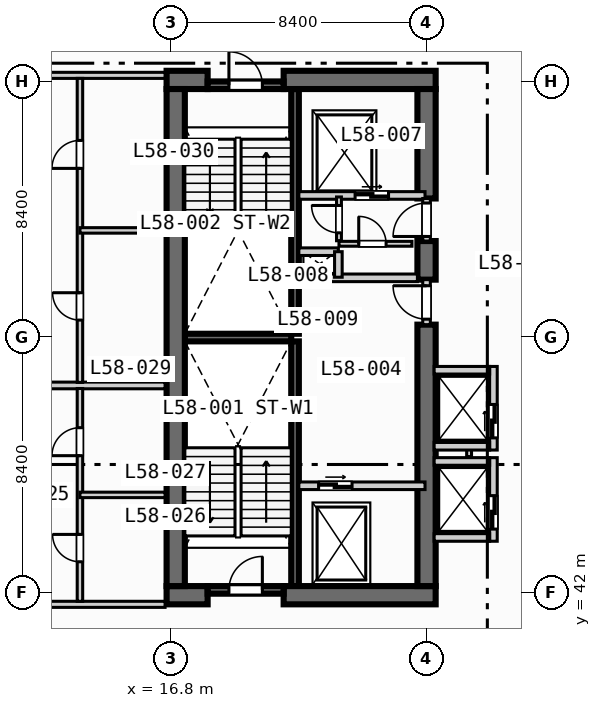
"""IFC4 building model, lengths in metres.
Left out: names, types, materials, properties, quantities, classifications, styles, units other than length and angle.
Written with IfcOpenShell. Run it as: python <this file> out.ifc"""

import sys

from ifc_helpers import new_model, si_unit, direction, frame, frame_2d, origin, place, context, subcontext, project, spatial, rectangle, extrude, element, fill, save


model = new_model("IFC4")
c1 = context("Model", 3, precision=1e-05, world=origin(), true_north=direction((0.0, 1.0)))
c2 = subcontext(c1, "Body", "Model", "MODEL_VIEW")
j1 = project(units=[si_unit("LENGTHUNIT", "METRE"), si_unit("PLANEANGLEUNIT", "RADIAN")], contexts=[c1])
p1 = place(None, origin())
s1 = spatial("IfcSite", under=j1, at=p1, CompositionType="ELEMENT")
p2 = place(p1, origin())
s2 = spatial("IfcBuilding", under=s1, at=p2, CompositionType="ELEMENT")
p3 = place(p2, frame((0.0, 0.0, 237.9)))
s3 = spatial("IfcBuildingStorey", under=s2, at=p3, CompositionType="ELEMENT", Elevation=237.9)
for number, where, z_axis, x_axis in (
    (1, (20.875, 42.2, 0.0), (0.0, 0.0, 1.0), (0.0, 1.0, 0.0)),
    (2, (20.875, 50.5, 0.0), (0.0, 0.0, 1.0), (0.0, 1.0, 0.0)),
):
    element("IfcWall", number, at=place(p3, frame(where, z_axis=z_axis, x_axis=x_axis)), inside=s3, PredefinedType="SOLIDWALL", context=c2, shape_type="SweptSolid", body=[
        extrude(rectangle(XDim=8.05, YDim=0.25, at=frame_2d((4.025, 0.0))), origin(), (0.0, 0.0, 1.0), 3.47),
    ])
p4 = place(p3, frame((17.25, 50.375, 0.0), z_axis=(0.0, 0.0, 1.0), x_axis=(1.0, 0.0, 0.0)))
e3 = element("IfcWall", 3, at=p4, inside=s3, PredefinedType="SOLIDWALL", context=c2, shape_type="SweptSolid", body=[
    extrude(rectangle(XDim=3.5, YDim=0.25, at=frame_2d((1.75, 0.0))), origin(), (0.0, 0.0, 1.0), 3.47),
])
p5 = place(p3, frame((16.65, 41.9, 0.0), z_axis=(0.0, 0.0, 1.0), x_axis=(1.0, 0.0, 0.0)))
e4 = element("IfcWall", 4, at=p5, inside=s3, PredefinedType="SHEAR", context=c2, shape_type="SweptSolid", body=[
    extrude(rectangle(XDim=1.35, YDim=0.6, at=frame_2d((0.675, 0.0))), origin(), (0.0, 0.0, 1.0), 3.47),
])
p6 = place(p3, frame((20.5, 41.9, 0.0), z_axis=(0.0, 0.0, 1.0), x_axis=(1.0, 0.0, 0.0)))
e5 = element("IfcWall", 5, at=p6, inside=s3, PredefinedType="SHEAR", context=c2, shape_type="SweptSolid", body=[
    extrude(rectangle(XDim=5.0, YDim=0.6, at=frame_2d((2.5, 0.0))), origin(), (0.0, 0.0, 1.0), 3.47),
])
p7 = place(p3, frame((16.65, 58.85, 0.0), z_axis=(0.0, 0.0, 1.0), x_axis=(1.0, 0.0, 0.0)))
e6 = element("IfcWall", 6, at=p7, inside=s3, PredefinedType="SHEAR", context=c2, shape_type="SweptSolid", body=[
    extrude(rectangle(XDim=1.35, YDim=0.6, at=frame_2d((0.675, 0.0))), origin(), (0.0, 0.0, 1.0), 3.47),
])
p8 = place(p3, frame((20.5, 58.85, 0.0), z_axis=(0.0, 0.0, 1.0), x_axis=(1.0, 0.0, 0.0)))
e7 = element("IfcWall", 7, at=p8, inside=s3, PredefinedType="SHEAR", context=c2, shape_type="SweptSolid", body=[
    extrude(rectangle(XDim=5.0, YDim=0.6, at=frame_2d((2.5, 0.0))), origin(), (0.0, 0.0, 1.0), 3.47),
])
p9 = place(p3, frame((16.95, 42.2, 0.0), z_axis=(0.0, 0.0, 1.0), x_axis=(0.0, 1.0, 0.0)))
e8 = element("IfcWall", 8, at=p9, inside=s3, PredefinedType="SHEAR", context=c2, shape_type="SweptSolid", body=[
    extrude(rectangle(XDim=16.35, YDim=0.6, at=frame_2d((8.175, 0.0))), origin(), (0.0, 0.0, 1.0), 3.47),
])
p10 = place(p3, frame((25.2, 42.2, 0.0), z_axis=(0.0, 0.0, 1.0), x_axis=(0.0, 1.0, 0.0)))
e9 = element("IfcWall", 9, at=p10, inside=s3, PredefinedType="SHEAR", context=c2, shape_type="SweptSolid", body=[
    extrude(rectangle(XDim=8.6, YDim=0.6, at=frame_2d((4.3, 0.0))), origin(), (0.0, 0.0, 1.0), 3.47),
])
p11 = place(p3, frame((25.2, 52.28, 0.0), z_axis=(0.0, 0.0, 1.0), x_axis=(0.0, 1.0, 0.0)))
e10 = element("IfcWall", 10, at=p11, inside=s3, PredefinedType="SHEAR", context=c2, shape_type="SweptSolid", body=[
    extrude(rectangle(XDim=1.27, YDim=0.6, at=frame_2d((0.635, 0.0))), origin(), (0.0, 0.0, 1.0), 3.47),
])
p12 = place(p3, frame((25.2, 54.95, 0.0), z_axis=(0.0, 0.0, 1.0), x_axis=(0.0, 1.0, 0.0)))
e11 = element("IfcWall", 11, at=p12, inside=s3, PredefinedType="SHEAR", context=c2, shape_type="SweptSolid", body=[
    extrude(rectangle(XDim=3.6, YDim=0.6, at=frame_2d((1.8, 0.0))), origin(), (0.0, 0.0, 1.0), 3.47),
])
p13 = place(p3, frame((18.0, 42.075, 0.0), z_axis=(0.0, 0.0, 1.0), x_axis=(1.0, 0.0, 0.0)))
e12 = element("IfcWall", 12, at=p13, inside=s3, PredefinedType="SOLIDWALL", context=c2, shape_type="SweptSolid", body=[
    extrude(rectangle(XDim=2.5, YDim=0.25, at=frame_2d((1.25, 0.0))), origin(), (0.0, 0.0, 1.0), 3.47),
])
p14 = place(p13, frame((0.7, 0.0, 0.0)))
e13 = element("IfcOpeningElement", 13, at=p14, cuts=e12, PredefinedType="OPENING", context=c2, shape_type="SweptSolid", body=[
    extrude(rectangle(XDim=1.1, YDim=2.15, at=frame_2d((0.55, 1.075))), frame((0.0, 0.135, 0.0), z_axis=(0.0, -1.0, 0.0), x_axis=(1.0, 0.0, 0.0)), (0.0, 0.0, 1.0), 0.27),
])
p15 = place(p3, frame((18.0, 58.675, 0.0), z_axis=(0.0, 0.0, 1.0), x_axis=(1.0, 0.0, 0.0)))
e14 = element("IfcWall", 14, at=p15, inside=s3, PredefinedType="SOLIDWALL", context=c2, shape_type="SweptSolid", body=[
    extrude(rectangle(XDim=2.5, YDim=0.25, at=frame_2d((1.25, 0.0))), origin(), (0.0, 0.0, 1.0), 3.47),
])
p16 = place(p15, frame((0.7, 0.0, 0.0)))
e15 = element("IfcOpeningElement", 15, at=p16, cuts=e14, PredefinedType="OPENING", context=c2, shape_type="SweptSolid", body=[
    extrude(rectangle(XDim=1.1, YDim=2.15, at=frame_2d((0.55, 1.075))), frame((0.0, 0.135, 0.0), z_axis=(0.0, -1.0, 0.0), x_axis=(1.0, 0.0, 0.0)), (0.0, 0.0, 1.0), 0.27),
])
p17 = place(p3, frame((21.0, 45.5, 0.0), z_axis=(0.0, 0.0, 1.0), x_axis=(1.0, 0.0, 0.0)))
e16 = element("IfcWall", 16, at=p17, inside=s3, PredefinedType="SOLIDWALL", context=c2, shape_type="SweptSolid", body=[
    extrude(rectangle(XDim=4.15, YDim=0.25, at=frame_2d((2.075, 0.0))), origin(), (0.0, 0.0, 1.0), 3.47),
])
p18 = place(p17, frame((0.65, 0.0, 0.0)))
e17 = element("IfcOpeningElement", 17, at=p18, cuts=e16, PredefinedType="OPENING", context=c2, shape_type="SweptSolid", body=[
    extrude(rectangle(XDim=1.1, YDim=2.15, at=frame_2d((0.55, 1.075))), frame((0.0, 0.135, 0.0), z_axis=(0.0, -1.0, 0.0), x_axis=(1.0, 0.0, 0.0)), (0.0, 0.0, 1.0), 0.27),
])
p19 = place(p3, frame((25.2, 50.8, 0.0), z_axis=(0.0, 0.0, 1.0), x_axis=(0.0, 1.0, 0.0)))
e18 = element("IfcWall", 18, at=p19, inside=s3, PredefinedType="SOLIDWALL", context=c2, shape_type="SweptSolid", body=[
    extrude(rectangle(XDim=1.48, YDim=0.25, at=frame_2d((0.74, 0.0))), origin(), (0.0, 0.0, 1.0), 3.47),
])
p20 = place(p19, frame((0.18, 0.0, 0.0)))
e19 = element("IfcOpeningElement", 19, at=p20, cuts=e18, PredefinedType="OPENING", context=c2, shape_type="SweptSolid", body=[
    extrude(rectangle(XDim=1.1, YDim=2.15, at=frame_2d((0.55, 1.075))), frame((0.0, 0.135, 0.0), z_axis=(0.0, -1.0, 0.0), x_axis=(1.0, 0.0, 0.0)), (0.0, 0.0, 1.0), 0.27),
])
p21 = place(p3, frame((21.0, 52.34, 0.0), z_axis=(0.0, 0.0, 1.0), x_axis=(1.0, 0.0, 0.0)))
e20 = element("IfcWall", 20, at=p21, inside=s3, PredefinedType="SOLIDWALL", context=c2, shape_type="SweptSolid", body=[
    extrude(rectangle(XDim=3.9, YDim=0.25, at=frame_2d((1.95, 0.0))), origin(), (0.0, 0.0, 1.0), 3.47),
])
p22 = place(p3, frame((21.0, 55.05, 0.0), z_axis=(0.0, 0.0, 1.0), x_axis=(1.0, 0.0, 0.0)))
e21 = element("IfcWall", 21, at=p22, inside=s3, PredefinedType="SOLIDWALL", context=c2, shape_type="SweptSolid", body=[
    extrude(rectangle(XDim=4.15, YDim=0.25, at=frame_2d((2.075, 0.0))), origin(), (0.0, 0.0, 1.0), 3.47),
])
p23 = place(p22, frame((1.85, 0.0, 0.0)))
e22 = element("IfcOpeningElement", 22, at=p23, cuts=e21, PredefinedType="OPENING", context=c2, shape_type="SweptSolid", body=[
    extrude(rectangle(XDim=1.1, YDim=2.15, at=frame_2d((0.55, 1.075))), frame((0.0, 0.135, 0.0), z_axis=(0.0, -1.0, 0.0), x_axis=(1.0, 0.0, 0.0)), (0.0, 0.0, 1.0), 0.27),
])
p24 = place(p3, frame((25.2, 53.55, 0.0), z_axis=(0.0, 0.0, 1.0), x_axis=(0.0, 1.0, 0.0)))
e23 = element("IfcWall", 23, at=p24, inside=s3, PredefinedType="SOLIDWALL", context=c2, shape_type="SweptSolid", body=[
    extrude(rectangle(XDim=1.4, YDim=0.25, at=frame_2d((0.7, 0.0))), origin(), (0.0, 0.0, 1.0), 3.47),
])
p25 = place(p24, frame((0.15, 0.0, 0.0)))
e24 = element("IfcOpeningElement", 24, at=p25, cuts=e23, PredefinedType="OPENING", context=c2, shape_type="SweptSolid", body=[
    extrude(rectangle(XDim=1.1, YDim=2.15, at=frame_2d((0.55, 1.075))), frame((0.0, 0.135, 0.0), z_axis=(0.0, -1.0, 0.0), x_axis=(1.0, 0.0, 0.0)), (0.0, 0.0, 1.0), 0.27),
])
p26 = place(p3, frame((21.0, 53.2, 0.0), z_axis=(0.0, 0.0, 1.0), x_axis=(1.0, 0.0, 0.0)))
e25 = element("IfcWall", 25, at=p26, inside=s3, PredefinedType="SOLIDWALL", context=c2, shape_type="SweptSolid", body=[
    extrude(rectangle(XDim=1.3, YDim=0.25, at=frame_2d((0.65, 0.0))), origin(), (0.0, 0.0, 1.0), 3.47),
])
p27 = place(p3, frame((22.3, 52.36, 0.0), z_axis=(0.0, 0.0, 1.0), x_axis=(0.0, 1.0, 0.0)))
e26 = element("IfcWall", 26, at=p27, inside=s3, PredefinedType="SOLIDWALL", context=c2, shape_type="SweptSolid", body=[
    extrude(rectangle(XDim=0.84, YDim=0.25, at=frame_2d((0.42, 0.0))), origin(), (0.0, 0.0, 1.0), 3.47),
])
p28 = place(p3, frame((22.32, 53.56, 0.0), z_axis=(0.0, 0.0, 1.0), x_axis=(0.0, 1.0, 0.0)))
e27 = element("IfcWall", 27, at=p28, inside=s3, PredefinedType="PARTITIONING", context=c2, shape_type="SweptSolid", body=[
    extrude(rectangle(XDim=1.44, YDim=0.16, at=frame_2d((0.72, 0.0))), origin(), (0.0, 0.0, 1.0), 3.47),
])
p29 = place(p28, frame((0.26, 0.0, 0.0)))
e28 = element("IfcOpeningElement", 28, at=p29, cuts=e27, PredefinedType="OPENING", context=c2, shape_type="SweptSolid", body=[
    extrude(rectangle(XDim=0.9, YDim=2.1, at=frame_2d((0.45, 1.05))), frame((0.0, 0.09, 0.0), z_axis=(0.0, -1.0, 0.0), x_axis=(1.0, 0.0, 0.0)), (0.0, 0.0, 1.0), 0.18),
])
p30 = place(p3, frame((22.32, 53.46, 0.0), z_axis=(0.0, 0.0, 1.0), x_axis=(1.0, 0.0, 0.0)))
e29 = element("IfcWall", 29, at=p30, inside=s3, PredefinedType="PARTITIONING", context=c2, shape_type="SweptSolid", body=[
    extrude(rectangle(XDim=2.4, YDim=0.16, at=frame_2d((1.2, 0.0))), origin(), (0.0, 0.0, 1.0), 3.47),
])
p31 = place(p30, frame((0.65, 0.0, 0.0)))
e30 = element("IfcOpeningElement", 30, at=p31, cuts=e29, PredefinedType="OPENING", context=c2, shape_type="SweptSolid", body=[
    extrude(rectangle(XDim=0.9, YDim=2.1, at=frame_2d((0.45, 1.05))), frame((0.0, 0.09, 0.0), z_axis=(0.0, -1.0, 0.0), x_axis=(1.0, 0.0, 0.0)), (0.0, 0.0, 1.0), 0.18),
])
p32 = place(p3, frame((27.4, 43.675, 0.0), z_axis=(0.0, 0.0, 1.0), x_axis=(0.0, 1.0, 0.0)))
e31 = element("IfcWall", 31, at=p32, inside=s3, PredefinedType="SOLIDWALL", context=c2, shape_type="SweptSolid", body=[
    extrude(rectangle(XDim=2.75, YDim=0.25, at=frame_2d((1.375, 0.0))), origin(), (0.0, 0.0, 1.0), 3.47),
])
p33 = place(p32, frame((0.4, 0.0, 0.0)))
e32 = element("IfcOpeningElement", 32, at=p33, cuts=e31, PredefinedType="OPENING", context=c2, shape_type="SweptSolid", body=[
    extrude(rectangle(XDim=1.1, YDim=2.15, at=frame_2d((0.55, 1.075))), frame((0.0, 0.135, 0.0), z_axis=(0.0, -1.0, 0.0), x_axis=(1.0, 0.0, 0.0)), (0.0, 0.0, 1.0), 0.27),
])
for number, where, z_axis, x_axis in (
    (33, (25.45, 43.8, 0.0), (0.0, 0.0, 1.0), (1.0, 0.0, 0.0)),
    (34, (25.45, 46.3, 0.0), (0.0, 0.0, 1.0), (1.0, 0.0, 0.0)),
):
    element("IfcWall", number, at=place(p3, frame(where, z_axis=z_axis, x_axis=x_axis)), inside=s3, PredefinedType="SOLIDWALL", context=c2, shape_type="SweptSolid", body=[
        extrude(rectangle(XDim=1.825, YDim=0.25, at=frame_2d((0.913, 0.0))), origin(), (0.0, 0.0, 1.0), 3.47),
    ])
p34 = place(p3, frame((26.6, 46.46, 0.0), z_axis=(0.0, 0.0, 1.0), x_axis=(0.0, 1.0, 0.0)))
e35 = element("IfcWall", 35, at=p34, inside=s3, PredefinedType="PARTITIONING", context=c2, shape_type="SweptSolid", body=[
    extrude(rectangle(XDim=0.88, YDim=0.16, at=frame_2d((0.44, 0.0))), origin(), (0.0, 0.0, 1.0), 3.47),
])
p35 = place(p3, frame((27.4, 46.675, 0.0), z_axis=(0.0, 0.0, 1.0), x_axis=(0.0, 1.0, 0.0)))
e36 = element("IfcWall", 36, at=p35, inside=s3, PredefinedType="SOLIDWALL", context=c2, shape_type="SweptSolid", body=[
    extrude(rectangle(XDim=2.75, YDim=0.25, at=frame_2d((1.375, 0.0))), origin(), (0.0, 0.0, 1.0), 3.47),
])
p36 = place(p35, frame((0.4, 0.0, 0.0)))
e37 = element("IfcOpeningElement", 37, at=p36, cuts=e36, PredefinedType="OPENING", context=c2, shape_type="SweptSolid", body=[
    extrude(rectangle(XDim=1.1, YDim=2.15, at=frame_2d((0.55, 1.075))), frame((0.0, 0.135, 0.0), z_axis=(0.0, -1.0, 0.0), x_axis=(1.0, 0.0, 0.0)), (0.0, 0.0, 1.0), 0.27),
])
for number, where, z_axis, x_axis in (
    (38, (25.45, 46.8, 0.0), (0.0, 0.0, 1.0), (1.0, 0.0, 0.0)),
    (39, (25.45, 49.3, 0.0), (0.0, 0.0, 1.0), (1.0, 0.0, 0.0)),
):
    element("IfcWall", number, at=place(p3, frame(where, z_axis=z_axis, x_axis=x_axis)), inside=s3, PredefinedType="SOLIDWALL", context=c2, shape_type="SweptSolid", body=[
        extrude(rectangle(XDim=1.825, YDim=0.25, at=frame_2d((0.913, 0.0))), origin(), (0.0, 0.0, 1.0), 3.47),
    ])
p37 = place(p3, frame((8.65, 41.6, 0.0), z_axis=(0.0, 0.0, 1.0), x_axis=(1.0, 0.0, 0.0)))
e40 = element("IfcWall", 40, at=p37, inside=s3, PredefinedType="PARTITIONING", context=c2, shape_type="SweptSolid", body=[
    extrude(rectangle(XDim=7.95, YDim=0.2, at=frame_2d((3.975, 0.0))), origin(), (0.0, 0.0, 1.0), 3.47),
])
p38 = place(p37, frame((2.0, 0.0, 0.0)))
e41 = element("IfcOpeningElement", 41, at=p38, cuts=e40, PredefinedType="OPENING", context=c2, shape_type="SweptSolid", body=[
    extrude(rectangle(XDim=1.0, YDim=2.15, at=frame_2d((0.5, 1.075))), frame((0.0, 0.11, 0.0), z_axis=(0.0, -1.0, 0.0), x_axis=(1.0, 0.0, 0.0)), (0.0, 0.0, 1.0), 0.22),
])
p39 = place(p3, frame((8.65, 59.0, 0.0), z_axis=(0.0, 0.0, 1.0), x_axis=(1.0, 0.0, 0.0)))
e42 = element("IfcWall", 42, at=p39, inside=s3, PredefinedType="PARTITIONING", context=c2, shape_type="SweptSolid", body=[
    extrude(rectangle(XDim=7.95, YDim=0.2, at=frame_2d((3.975, 0.0))), origin(), (0.0, 0.0, 1.0), 2.82),
])
p40 = place(p39, frame((2.0, 0.0, 0.0)))
e43 = element("IfcOpeningElement", 43, at=p40, cuts=e42, PredefinedType="OPENING", context=c2, shape_type="SweptSolid", body=[
    extrude(rectangle(XDim=1.0, YDim=2.15, at=frame_2d((0.5, 1.075))), frame((0.0, 0.11, 0.0), z_axis=(0.0, -1.0, 0.0), x_axis=(1.0, 0.0, 0.0)), (0.0, 0.0, 1.0), 0.22),
])
p41 = place(p3, frame((8.65, 48.8, 0.0), z_axis=(0.0, 0.0, 1.0), x_axis=(1.0, 0.0, 0.0)))
e44 = element("IfcWall", 44, at=p41, inside=s3, PredefinedType="PARTITIONING", context=c2, shape_type="SweptSolid", body=[
    extrude(rectangle(XDim=7.95, YDim=0.22, at=frame_2d((3.975, 0.0))), origin(), (0.0, 0.0, 1.0), 3.47),
])
p42 = place(p3, frame((13.8, 41.7, 0.0), z_axis=(0.0, 0.0, 1.0), x_axis=(0.0, 1.0, 0.0)))
e45 = element("IfcWall", 45, at=p42, inside=s3, PredefinedType="PLUMBINGWALL", context=c2, shape_type="SweptSolid", body=[
    extrude(rectangle(XDim=7.0, YDim=0.18, at=frame_2d((3.5, 0.0))), origin(), (0.0, 0.0, 1.0), 3.47),
])
p43 = place(p42, frame((1.3, 0.0, 0.0)))
e46 = element("IfcOpeningElement", 46, at=p43, cuts=e45, PredefinedType="OPENING", context=c2, shape_type="SweptSolid", body=[
    extrude(rectangle(XDim=0.9, YDim=2.1, at=frame_2d((0.45, 1.05))), frame((0.0, 0.1, 0.0), z_axis=(0.0, -1.0, 0.0), x_axis=(1.0, 0.0, 0.0)), (0.0, 0.0, 1.0), 0.2),
])
p44 = place(p42, frame((4.79, 0.0, 0.0)))
e47 = element("IfcOpeningElement", 47, at=p44, cuts=e45, PredefinedType="OPENING", context=c2, shape_type="SweptSolid", body=[
    extrude(rectangle(XDim=0.92, YDim=2.1, at=frame_2d((0.46, 1.05))), frame((0.0, 0.1, 0.0), z_axis=(0.0, -1.0, 0.0), x_axis=(1.0, 0.0, 0.0)), (0.0, 0.0, 1.0), 0.2),
])
p45 = place(p3, frame((13.8, 45.2, 0.0), z_axis=(0.0, 0.0, 1.0), x_axis=(1.0, 0.0, 0.0)))
e48 = element("IfcWall", 48, at=p45, inside=s3, PredefinedType="PLUMBINGWALL", context=c2, shape_type="SweptSolid", body=[
    extrude(rectangle(XDim=2.8, YDim=0.18, at=frame_2d((1.4, 0.0))), origin(), (0.0, 0.0, 1.0), 3.47),
])
p46 = place(p3, frame((13.8, 48.9, 0.0), z_axis=(0.0, 0.0, 1.0), x_axis=(0.0, 1.0, 0.0)))
e49 = element("IfcWall", 49, at=p46, inside=s3, PredefinedType="PLUMBINGWALL", context=c2, shape_type="SweptSolid", body=[
    extrude(rectangle(XDim=10.0, YDim=0.18, at=frame_2d((5.0, 0.0))), origin(), (0.0, 0.0, 1.0), 3.47),
])
p47 = place(p46, frame((2.05, 0.0, 0.0)))
e50 = element("IfcOpeningElement", 50, at=p47, cuts=e49, PredefinedType="OPENING", context=c2, shape_type="SweptSolid", body=[
    extrude(rectangle(XDim=0.9, YDim=2.1, at=frame_2d((0.45, 1.05))), frame((0.0, 0.1, 0.0), z_axis=(0.0, -1.0, 0.0), x_axis=(1.0, 0.0, 0.0)), (0.0, 0.0, 1.0), 0.2),
])
p48 = place(p46, frame((7.04, 0.0, 0.0)))
e51 = element("IfcOpeningElement", 51, at=p48, cuts=e49, PredefinedType="OPENING", context=c2, shape_type="SweptSolid", body=[
    extrude(rectangle(XDim=0.92, YDim=2.1, at=frame_2d((0.46, 1.05))), frame((0.0, 0.1, 0.0), z_axis=(0.0, -1.0, 0.0), x_axis=(1.0, 0.0, 0.0)), (0.0, 0.0, 1.0), 0.2),
])
p49 = place(p3, frame((13.8, 53.9, 0.0), z_axis=(0.0, 0.0, 1.0), x_axis=(1.0, 0.0, 0.0)))
e52 = element("IfcWall", 52, at=p49, inside=s3, PredefinedType="PLUMBINGWALL", context=c2, shape_type="SweptSolid", body=[
    extrude(rectangle(XDim=2.8, YDim=0.18, at=frame_2d((1.4, 0.0))), origin(), (0.0, 0.0, 1.0), 3.47),
])
p50 = place(p14, origin())
e53 = element("IfcDoor", 53, at=p50, inside=s3, OperationType="SINGLE_SWING_RIGHT", PredefinedType="DOOR", context=c2, shape_type="SweptSolid", body=[
    extrude(rectangle(XDim=1.1, YDim=2.15, at=frame_2d((0.55, 1.075))), frame((0.0, 0.025, 0.0), z_axis=(0.0, -1.0, 0.0), x_axis=(1.0, 0.0, 0.0)), (0.0, 0.0, 1.0), 0.05),
])
fill(e13, e53)
p51 = place(p16, origin())
e54 = element("IfcDoor", 54, at=p51, inside=s3, OperationType="SINGLE_SWING_LEFT", PredefinedType="DOOR", context=c2, shape_type="SweptSolid", body=[
    extrude(rectangle(XDim=1.1, YDim=2.15, at=frame_2d((0.55, 1.075))), frame((0.0, 0.025, 0.0), z_axis=(0.0, -1.0, 0.0), x_axis=(1.0, 0.0, 0.0)), (0.0, 0.0, 1.0), 0.05),
])
fill(e15, e54)
p52 = place(p18, origin())
e55 = element("IfcDoor", 55, at=p52, inside=s3, OperationType="SLIDING_TO_LEFT", PredefinedType="DOOR", context=c2, shape_type="SweptSolid", body=[
    extrude(rectangle(XDim=1.1, YDim=2.15, at=frame_2d((0.55, 1.075))), frame((0.0, 0.025, 0.0), z_axis=(0.0, -1.0, 0.0), x_axis=(1.0, 0.0, 0.0)), (0.0, 0.0, 1.0), 0.05),
])
fill(e17, e55)
p53 = place(p20, origin())
e56 = element("IfcDoor", 56, at=p53, inside=s3, OperationType="SINGLE_SWING_RIGHT", PredefinedType="DOOR", context=c2, shape_type="SweptSolid", body=[
    extrude(rectangle(XDim=1.1, YDim=2.15, at=frame_2d((0.55, 1.075))), frame((0.0, 0.025, 0.0), z_axis=(0.0, -1.0, 0.0), x_axis=(1.0, 0.0, 0.0)), (0.0, 0.0, 1.0), 0.05),
])
fill(e19, e56)
p54 = place(p23, origin())
e57 = element("IfcDoor", 57, at=p54, inside=s3, OperationType="SLIDING_TO_LEFT", PredefinedType="DOOR", context=c2, shape_type="SweptSolid", body=[
    extrude(rectangle(XDim=1.1, YDim=2.15, at=frame_2d((0.55, 1.075))), frame((0.0, 0.025, 0.0), z_axis=(0.0, -1.0, 0.0), x_axis=(1.0, 0.0, 0.0)), (0.0, 0.0, 1.0), 0.05),
])
fill(e22, e57)
p55 = place(p25, origin())
e58 = element("IfcDoor", 58, at=p55, inside=s3, OperationType="SINGLE_SWING_LEFT", PredefinedType="DOOR", context=c2, shape_type="SweptSolid", body=[
    extrude(rectangle(XDim=1.1, YDim=2.15, at=frame_2d((0.55, 1.075))), frame((0.0, 0.025, 0.0), z_axis=(0.0, -1.0, 0.0), x_axis=(1.0, 0.0, 0.0)), (0.0, 0.0, 1.0), 0.05),
])
fill(e24, e58)
p56 = place(p29, origin())
e59 = element("IfcDoor", 59, at=p56, inside=s3, OperationType="SINGLE_SWING_RIGHT", PredefinedType="DOOR", context=c2, shape_type="SweptSolid", body=[
    extrude(rectangle(XDim=0.9, YDim=2.1, at=frame_2d((0.45, 1.05))), frame((0.0, 0.025, 0.0), z_axis=(0.0, -1.0, 0.0), x_axis=(1.0, 0.0, 0.0)), (0.0, 0.0, 1.0), 0.05),
])
fill(e28, e59)
p57 = place(p31, origin())
e60 = element("IfcDoor", 60, at=p57, inside=s3, OperationType="SINGLE_SWING_LEFT", PredefinedType="DOOR", context=c2, shape_type="SweptSolid", body=[
    extrude(rectangle(XDim=0.9, YDim=2.1, at=frame_2d((0.45, 1.05))), frame((0.0, 0.025, 0.0), z_axis=(0.0, -1.0, 0.0), x_axis=(1.0, 0.0, 0.0)), (0.0, 0.0, 1.0), 0.05),
])
fill(e30, e60)
p58 = place(p33, origin())
e61 = element("IfcDoor", 61, at=p58, inside=s3, OperationType="SLIDING_TO_LEFT", PredefinedType="DOOR", context=c2, shape_type="SweptSolid", body=[
    extrude(rectangle(XDim=1.1, YDim=2.15, at=frame_2d((0.55, 1.075))), frame((0.0, 0.025, 0.0), z_axis=(0.0, -1.0, 0.0), x_axis=(1.0, 0.0, 0.0)), (0.0, 0.0, 1.0), 0.05),
])
fill(e32, e61)
p59 = place(p36, origin())
e62 = element("IfcDoor", 62, at=p59, inside=s3, OperationType="SLIDING_TO_LEFT", PredefinedType="DOOR", context=c2, shape_type="SweptSolid", body=[
    extrude(rectangle(XDim=1.1, YDim=2.15, at=frame_2d((0.55, 1.075))), frame((0.0, 0.025, 0.0), z_axis=(0.0, -1.0, 0.0), x_axis=(1.0, 0.0, 0.0)), (0.0, 0.0, 1.0), 0.05),
])
fill(e37, e62)
p60 = place(p43, origin())
e63 = element("IfcDoor", 63, at=p60, inside=s3, OperationType="SINGLE_SWING_RIGHT", PredefinedType="DOOR", context=c2, shape_type="SweptSolid", body=[
    extrude(rectangle(XDim=0.9, YDim=2.1, at=frame_2d((0.45, 1.05))), frame((0.0, 0.025, 0.0), z_axis=(0.0, -1.0, 0.0), x_axis=(1.0, 0.0, 0.0)), (0.0, 0.0, 1.0), 0.05),
])
fill(e46, e63)
p61 = place(p44, origin())
e64 = element("IfcDoor", 64, at=p61, inside=s3, OperationType="SINGLE_SWING_LEFT", PredefinedType="DOOR", context=c2, shape_type="SweptSolid", body=[
    extrude(rectangle(XDim=0.92, YDim=2.1, at=frame_2d((0.46, 1.05))), frame((0.0, 0.025, 0.0), z_axis=(0.0, -1.0, 0.0), x_axis=(1.0, 0.0, 0.0)), (0.0, 0.0, 1.0), 0.05),
])
fill(e47, e64)
p62 = place(p47, origin())
e65 = element("IfcDoor", 65, at=p62, inside=s3, OperationType="SINGLE_SWING_RIGHT", PredefinedType="DOOR", context=c2, shape_type="SweptSolid", body=[
    extrude(rectangle(XDim=0.9, YDim=2.1, at=frame_2d((0.45, 1.05))), frame((0.0, 0.025, 0.0), z_axis=(0.0, -1.0, 0.0), x_axis=(1.0, 0.0, 0.0)), (0.0, 0.0, 1.0), 0.05),
])
fill(e50, e65)
p63 = place(p48, origin())
e66 = element("IfcDoor", 66, at=p63, inside=s3, OperationType="SINGLE_SWING_LEFT", PredefinedType="DOOR", context=c2, shape_type="SweptSolid", body=[
    extrude(rectangle(XDim=0.92, YDim=2.1, at=frame_2d((0.46, 1.05))), frame((0.0, 0.025, 0.0), z_axis=(0.0, -1.0, 0.0), x_axis=(1.0, 0.0, 0.0)), (0.0, 0.0, 1.0), 0.05),
])
fill(e51, e66)
save(model, sys.argv[1])
